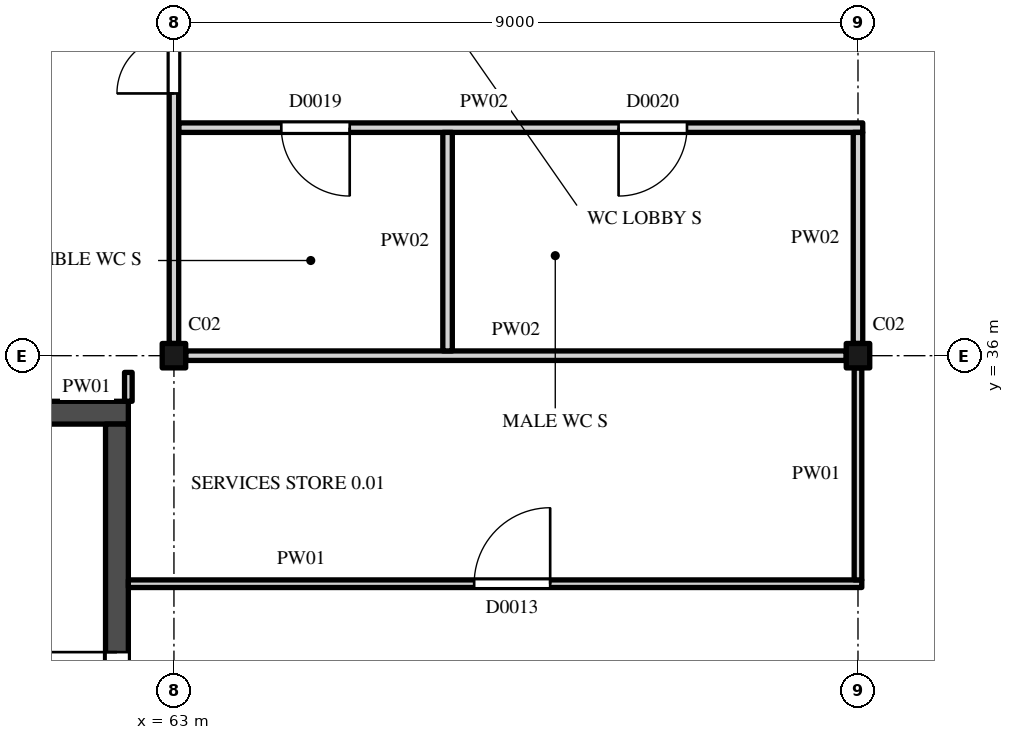
"""IFC4 building model, lengths in metres.
Left out: names, types, materials, properties, quantities, classifications, styles, units other than length and angle.
Written with IfcOpenShell. Run it as: python <this file> out.ifc"""

import sys

from ifc_helpers import new_model, si_unit, direction, frame, frame_2d, origin, origin_2d, place, context, subcontext, project, spatial, rectangle, i_section, extrude, element, fill, save


model = new_model("IFC4")
c1 = context("Model", 3, precision=1e-05, world=origin(), true_north=direction((0.0, 1.0)))
c2 = subcontext(c1, "Body", "Model", "MODEL_VIEW")
j1 = project(units=[si_unit("LENGTHUNIT", "METRE"), si_unit("PLANEANGLEUNIT", "RADIAN")], contexts=[c1])
p1 = place(None, origin())
s1 = spatial("IfcSite", under=j1, at=p1, CompositionType="ELEMENT")
p2 = place(p1, origin())
s2 = spatial("IfcBuilding", under=s1, at=p2, CompositionType="ELEMENT")
p3 = place(p2, origin())
s3 = spatial("IfcBuildingStorey", under=s2, at=p3, CompositionType="ELEMENT", Elevation=0.0)
for number, where, z_axis, x_axis in (
    (1, (63.0, 36.0, 0.0), (0.0, 0.0, 1.0), (1.0, 0.0, 0.0)),
    (2, (72.0, 36.0, 0.0), (0.0, 0.0, 1.0), (1.0, 0.0, 0.0)),
):
    element("IfcColumn", number, at=place(p3, frame(where, z_axis=z_axis, x_axis=x_axis)), inside=s3, PredefinedType="COLUMN", context=c2, shape_type="SweptSolid", body=[
        extrude(i_section(OverallWidth=0.309, OverallDepth=0.321, WebThickness=0.014, FlangeThickness=0.022, FilletRadius=0.017, at=origin_2d()), origin(), (0.0, 0.0, 1.0), 6.0),
    ])
p4 = place(p3, frame((54.3, 35.25, 0.0), z_axis=(0.0, 0.0, 1.0), x_axis=(1.0, 0.0, 0.0)))
e3 = element("IfcWall", 3, at=p4, inside=s3, PredefinedType="SHEAR", context=c2, shape_type="SweptSolid", body=[
    extrude(rectangle(XDim=8.1, YDim=0.3, at=frame_2d((4.05, 0.0))), origin(), (0.0, 0.0, 1.0), 6.0),
])
p5 = place(p3, frame((62.25, 27.9, 0.0), z_axis=(0.0, 0.0, 1.0), x_axis=(0.0, 1.0, 0.0)))
e4 = element("IfcWall", 4, at=p5, inside=s3, PredefinedType="SHEAR", context=c2, shape_type="SweptSolid", body=[
    extrude(rectangle(XDim=7.2, YDim=0.3, at=frame_2d((3.6, 0.0))), origin(), (0.0, 0.0, 1.0), 6.0),
])
p6 = place(p5, frame((3.0, 0.0, 0.0)))
e5 = element("IfcOpeningElement", 5, at=p6, cuts=e4, PredefinedType="OPENING", context=c2, shape_type="SweptSolid", body=[
    extrude(rectangle(XDim=1.2, YDim=2.1, at=frame_2d((0.6, 1.05))), frame((0.0, 0.16, 0.0), z_axis=(0.0, -1.0, 0.0), x_axis=(1.0, 0.0, 0.0)), (0.0, 0.0, 1.0), 0.32),
])
p7 = place(p3, frame((62.4, 33.0, 0.0), z_axis=(0.0, 0.0, 1.0), x_axis=(1.0, 0.0, 0.0)))
e6 = element("IfcWall", 6, at=p7, inside=s3, PredefinedType="PARTITIONING", context=c2, shape_type="SweptSolid", body=[
    extrude(rectangle(XDim=9.65, YDim=0.1, at=frame_2d((4.825, 0.0))), origin(), (0.0, 0.0, 1.0), 5.422),
])
p8 = place(p7, frame((4.55, 0.0, 0.0)))
e7 = element("IfcOpeningElement", 7, at=p8, cuts=e6, PredefinedType="OPENING", context=c2, shape_type="SweptSolid", body=[
    extrude(rectangle(XDim=1.0, YDim=2.1, at=frame_2d((0.5, 1.05))), frame((0.0, 0.06, 0.0), z_axis=(0.0, -1.0, 0.0), x_axis=(1.0, 0.0, 0.0)), (0.0, 0.0, 1.0), 0.12),
])
p9 = place(p3, frame((63.155, 36.0, 0.0), z_axis=(0.0, 0.0, 1.0), x_axis=(1.0, 0.0, 0.0)))
e8 = element("IfcWall", 8, at=p9, inside=s3, PredefinedType="PARTITIONING", context=c2, shape_type="SweptSolid", body=[
    extrude(rectangle(XDim=8.691, YDim=0.125, at=frame_2d((4.345, 0.0))), origin(), (0.0, 0.0, 1.0), 5.419),
])
p10 = place(p3, frame((63.062, 39.0, 0.0), z_axis=(0.0, 0.0, 1.0), x_axis=(1.0, 0.0, 0.0)))
e9 = element("IfcWall", 9, at=p10, inside=s3, PredefinedType="PARTITIONING", context=c2, shape_type="SweptSolid", body=[
    extrude(rectangle(XDim=9.0, YDim=0.125, at=frame_2d((4.5, 0.0))), origin(), (0.0, 0.0, 1.0), 5.422),
])
p11 = place(p10, frame((1.35, 0.0, 0.0)))
e10 = element("IfcOpeningElement", 10, at=p11, cuts=e9, PredefinedType="OPENING", context=c2, shape_type="SweptSolid", body=[
    extrude(rectangle(XDim=0.9, YDim=2.1, at=frame_2d((0.45, 1.05))), frame((0.0, 0.073, 0.0), z_axis=(0.0, -1.0, 0.0), x_axis=(1.0, 0.0, 0.0)), (0.0, 0.0, 1.0), 0.145),
])
p12 = place(p10, frame((5.788, 0.0, 0.0)))
e11 = element("IfcOpeningElement", 11, at=p12, cuts=e9, PredefinedType="OPENING", context=c2, shape_type="SweptSolid", body=[
    extrude(rectangle(XDim=0.9, YDim=2.1, at=frame_2d((0.45, 1.05))), frame((0.0, 0.073, 0.0), z_axis=(0.0, -1.0, 0.0), x_axis=(1.0, 0.0, 0.0)), (0.0, 0.0, 1.0), 0.145),
])
p13 = place(p3, frame((62.4, 35.4, 0.0), z_axis=(0.0, 0.0, 1.0), x_axis=(0.0, 1.0, 0.0)))
e12 = element("IfcWall", 12, at=p13, inside=s3, PredefinedType="PARTITIONING", context=c2, shape_type="SweptSolid", body=[
    extrude(rectangle(XDim=0.38, YDim=0.1, at=frame_2d((0.19, 0.0))), origin(), (0.0, 0.0, 1.0), 5.825),
])
p14 = place(p3, frame((63.0, 36.16, 0.0), z_axis=(0.0, 0.0, 1.0), x_axis=(0.0, 1.0, 0.0)))
e13 = element("IfcWall", 13, at=p14, inside=s3, PredefinedType="PARTITIONING", context=c2, shape_type="SweptSolid", body=[
    extrude(rectangle(XDim=8.679, YDim=0.125, at=frame_2d((4.34, 0.0))), origin(), (0.0, 0.0, 1.0), 5.292),
])
p15 = place(p14, frame((3.29, 0.0, 0.0)))
e14 = element("IfcOpeningElement", 14, at=p15, cuts=e13, PredefinedType="OPENING", context=c2, shape_type="SweptSolid", body=[
    extrude(rectangle(XDim=1.5, YDim=2.1, at=frame_2d((0.75, 1.05))), frame((0.0, 0.073, 0.0), z_axis=(0.0, -1.0, 0.0), x_axis=(1.0, 0.0, 0.0)), (0.0, 0.0, 1.0), 0.145),
])
p16 = place(p3, frame((66.6, 36.062, 0.0), z_axis=(0.0, 0.0, 1.0), x_axis=(0.0, 1.0, 0.0)))
e15 = element("IfcWall", 15, at=p16, inside=s3, PredefinedType="PARTITIONING", context=c2, shape_type="SweptSolid", body=[
    extrude(rectangle(XDim=2.875, YDim=0.125, at=frame_2d((1.438, 0.0))), origin(), (0.0, 0.0, 1.0), 5.825),
])
p17 = place(p3, frame((72.0, 33.05, 0.0), z_axis=(0.0, 0.0, 1.0), x_axis=(0.0, 1.0, 0.0)))
e16 = element("IfcWall", 16, at=p17, inside=s3, PredefinedType="PARTITIONING", context=c2, shape_type="SweptSolid", body=[
    extrude(rectangle(XDim=2.79, YDim=0.1, at=frame_2d((1.395, 0.0))), origin(), (0.0, 0.0, 1.0), 5.292),
])
p18 = place(p3, frame((72.0, 36.16, 0.0), z_axis=(0.0, 0.0, 1.0), x_axis=(0.0, 1.0, 0.0)))
e17 = element("IfcWall", 17, at=p18, inside=s3, PredefinedType="PARTITIONING", context=c2, shape_type="SweptSolid", body=[
    extrude(rectangle(XDim=2.777, YDim=0.125, at=frame_2d((1.389, 0.0))), origin(), (0.0, 0.0, 1.0), 5.292),
])
p19 = place(p6, origin())
e18 = element("IfcDoor", 18, at=p19, inside=s3, OperationType="SINGLE_SWING_LEFT", PredefinedType="DOOR", context=c2, shape_type="SweptSolid", body=[
    extrude(rectangle(XDim=1.2, YDim=2.1, at=frame_2d((0.6, 1.05))), frame((0.0, 0.025, 0.0), z_axis=(0.0, -1.0, 0.0), x_axis=(1.0, 0.0, 0.0)), (0.0, 0.0, 1.0), 0.05),
])
fill(e5, e18)
p20 = place(p8, origin())
e19 = element("IfcDoor", 19, at=p20, inside=s3, OperationType="SINGLE_SWING_LEFT", PredefinedType="DOOR", context=c2, shape_type="SweptSolid", body=[
    extrude(rectangle(XDim=1.0, YDim=2.1, at=frame_2d((0.5, 1.05))), frame((0.0, 0.025, 0.0), z_axis=(0.0, -1.0, 0.0), x_axis=(1.0, 0.0, 0.0)), (0.0, 0.0, 1.0), 0.05),
])
fill(e7, e19)
p21 = place(p11, origin())
e20 = element("IfcDoor", 20, at=p21, inside=s3, OperationType="SINGLE_SWING_RIGHT", PredefinedType="DOOR", context=c2, shape_type="SweptSolid", body=[
    extrude(rectangle(XDim=0.9, YDim=2.1, at=frame_2d((0.45, 1.05))), frame((0.0, 0.025, 0.0), z_axis=(0.0, -1.0, 0.0), x_axis=(1.0, 0.0, 0.0)), (0.0, 0.0, 1.0), 0.05),
])
fill(e10, e20)
p22 = place(p12, origin())
e21 = element("IfcDoor", 21, at=p22, inside=s3, OperationType="SINGLE_SWING_LEFT", PredefinedType="DOOR", context=c2, shape_type="SweptSolid", body=[
    extrude(rectangle(XDim=0.9, YDim=2.1, at=frame_2d((0.45, 1.05))), frame((0.0, 0.025, 0.0), z_axis=(0.0, -1.0, 0.0), x_axis=(1.0, 0.0, 0.0)), (0.0, 0.0, 1.0), 0.05),
])
fill(e11, e21)
p23 = place(p15, origin())
e22 = element("IfcDoor", 22, at=p23, inside=s3, OperationType="DOUBLE_DOOR_SINGLE_SWING", PredefinedType="DOOR", context=c2, shape_type="SweptSolid", body=[
    extrude(rectangle(XDim=1.5, YDim=2.1, at=frame_2d((0.75, 1.05))), frame((0.0, 0.025, 0.0), z_axis=(0.0, -1.0, 0.0), x_axis=(1.0, 0.0, 0.0)), (0.0, 0.0, 1.0), 0.05),
])
fill(e14, e22)
save(model, sys.argv[1])
